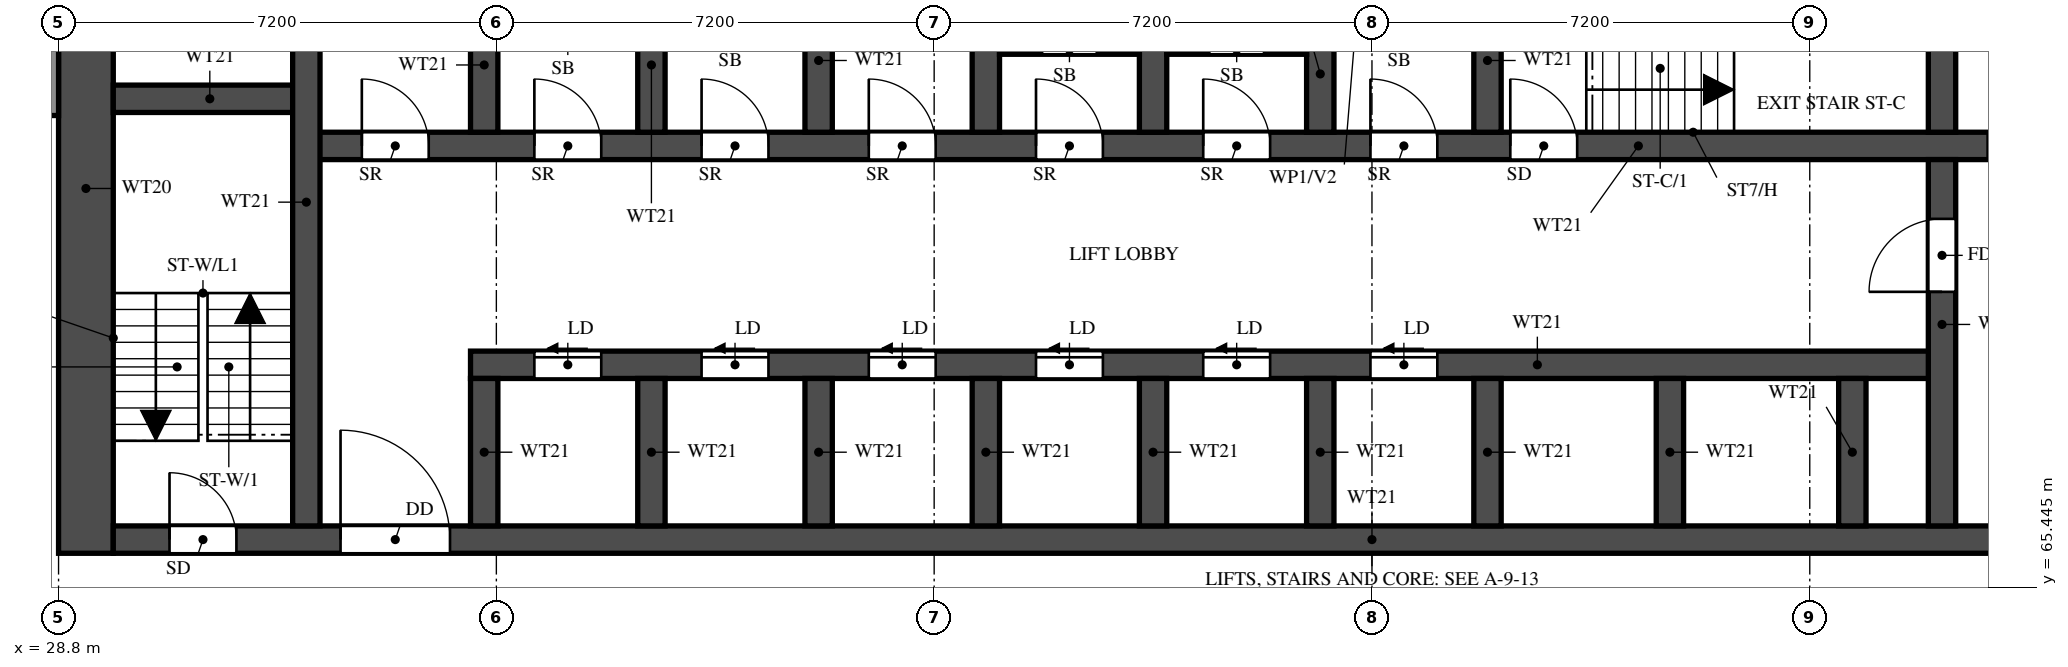
"""IFC4 building model, lengths in metres.
Left out: names, types, materials, properties, quantities, classifications, styles, units other than length and angle.
Written with IfcOpenShell. Run it as: python <this file> out.ifc"""

import sys

from ifc_helpers import new_model, si_unit, direction, frame, frame_2d, origin, place, context, subcontext, project, spatial, rectangle, extrude, element, fill, save


model = new_model("IFC4")
c1 = context("Model", 3, precision=1e-05, world=origin(), true_north=direction((0.0, 1.0)))
c2 = subcontext(c1, "Body", "Model", "MODEL_VIEW")
j1 = project(units=[si_unit("LENGTHUNIT", "METRE"), si_unit("PLANEANGLEUNIT", "RADIAN")], contexts=[c1])
p1 = place(None, origin())
s1 = spatial("IfcSite", under=j1, at=p1, CompositionType="ELEMENT")
p2 = place(p1, origin())
s2 = spatial("IfcBuilding", under=s1, at=p2, CompositionType="ELEMENT")
p3 = place(p2, frame((0.0, 0.0, 86.5)))
s3 = spatial("IfcBuildingStorey", under=s2, at=p3, CompositionType="ELEMENT", Elevation=86.5)
p4 = place(p3, frame((29.25, 66.0, 0.0), z_axis=(0.0, 0.0, 1.0), x_axis=(0.0, 1.0, 0.0)))
e1 = element("IfcWall", 1, at=p4, inside=s3, PredefinedType="SHEAR", context=c2, shape_type="SweptSolid", body=[
    extrude(rectangle(XDim=12.0, YDim=0.9, at=frame_2d((6.0, 0.0))), origin(), (0.0, 0.0, 1.0), 3.18),
])
p5 = place(p3, frame((29.7, 66.225, 0.0), z_axis=(0.0, 0.0, 1.0), x_axis=(1.0, 0.0, 0.0)))
e2 = element("IfcWall", 2, at=p5, inside=s3, PredefinedType="SHEAR", context=c2, shape_type="SweptSolid", body=[
    extrude(rectangle(XDim=41.4, YDim=0.45, at=frame_2d((20.7, 0.0))), origin(), (0.0, 0.0, 1.0), 3.18),
])
p6 = place(p5, frame((0.925, 0.0, 0.0)))
e3 = element("IfcOpeningElement", 3, at=p6, cuts=e2, PredefinedType="OPENING", context=c2, shape_type="SweptSolid", body=[
    extrude(rectangle(XDim=1.1, YDim=2.1, at=frame_2d((0.55, 1.05))), frame((0.0, 0.235, 0.0), z_axis=(0.0, -1.0, 0.0), x_axis=(1.0, 0.0, 0.0)), (0.0, 0.0, 1.0), 0.47),
])
p7 = place(p5, frame((3.738, 0.0, 0.0)))
e4 = element("IfcOpeningElement", 4, at=p7, cuts=e2, PredefinedType="OPENING", context=c2, shape_type="SweptSolid", body=[
    extrude(rectangle(XDim=1.8, YDim=2.1, at=frame_2d((0.9, 1.05))), frame((0.0, 0.235, 0.0), z_axis=(0.0, -1.0, 0.0), x_axis=(1.0, 0.0, 0.0)), (0.0, 0.0, 1.0), 0.47),
])
p8 = place(p3, frame((35.575, 69.1, 0.0), z_axis=(0.0, 0.0, 1.0), x_axis=(1.0, 0.0, 0.0)))
e5 = element("IfcWall", 5, at=p8, inside=s3, PredefinedType="SHEAR", context=c2, shape_type="SweptSolid", body=[
    extrude(rectangle(XDim=24.2, YDim=0.45, at=frame_2d((12.1, 0.0))), origin(), (0.0, 0.0, 1.0), 3.18),
])
p9 = place(p8, frame((1.05, 0.0, 0.0)))
e6 = element("IfcOpeningElement", 6, at=p9, cuts=e5, PredefinedType="OPENING", context=c2, shape_type="SweptSolid", body=[
    extrude(rectangle(XDim=1.1, YDim=2.1, at=frame_2d((0.55, 1.05))), frame((0.0, 0.235, 0.0), z_axis=(0.0, -1.0, 0.0), x_axis=(1.0, 0.0, 0.0)), (0.0, 0.0, 1.0), 0.47),
])
p10 = place(p8, frame((3.8, 0.0, 0.0)))
e7 = element("IfcOpeningElement", 7, at=p10, cuts=e5, PredefinedType="OPENING", context=c2, shape_type="SweptSolid", body=[
    extrude(rectangle(XDim=1.1, YDim=2.1, at=frame_2d((0.55, 1.05))), frame((0.0, 0.235, 0.0), z_axis=(0.0, -1.0, 0.0), x_axis=(1.0, 0.0, 0.0)), (0.0, 0.0, 1.0), 0.47),
])
p11 = place(p8, frame((6.55, 0.0, 0.0)))
e8 = element("IfcOpeningElement", 8, at=p11, cuts=e5, PredefinedType="OPENING", context=c2, shape_type="SweptSolid", body=[
    extrude(rectangle(XDim=1.1, YDim=2.1, at=frame_2d((0.55, 1.05))), frame((0.0, 0.235, 0.0), z_axis=(0.0, -1.0, 0.0), x_axis=(1.0, 0.0, 0.0)), (0.0, 0.0, 1.0), 0.47),
])
p12 = place(p8, frame((9.3, 0.0, 0.0)))
e9 = element("IfcOpeningElement", 9, at=p12, cuts=e5, PredefinedType="OPENING", context=c2, shape_type="SweptSolid", body=[
    extrude(rectangle(XDim=1.1, YDim=2.1, at=frame_2d((0.55, 1.05))), frame((0.0, 0.235, 0.0), z_axis=(0.0, -1.0, 0.0), x_axis=(1.0, 0.0, 0.0)), (0.0, 0.0, 1.0), 0.47),
])
p13 = place(p8, frame((12.05, 0.0, 0.0)))
e10 = element("IfcOpeningElement", 10, at=p13, cuts=e5, PredefinedType="OPENING", context=c2, shape_type="SweptSolid", body=[
    extrude(rectangle(XDim=1.1, YDim=2.1, at=frame_2d((0.55, 1.05))), frame((0.0, 0.235, 0.0), z_axis=(0.0, -1.0, 0.0), x_axis=(1.0, 0.0, 0.0)), (0.0, 0.0, 1.0), 0.47),
])
p14 = place(p8, frame((14.8, 0.0, 0.0)))
e11 = element("IfcOpeningElement", 11, at=p14, cuts=e5, PredefinedType="OPENING", context=c2, shape_type="SweptSolid", body=[
    extrude(rectangle(XDim=1.1, YDim=2.1, at=frame_2d((0.55, 1.05))), frame((0.0, 0.235, 0.0), z_axis=(0.0, -1.0, 0.0), x_axis=(1.0, 0.0, 0.0)), (0.0, 0.0, 1.0), 0.47),
])
p15 = place(p3, frame((32.875, 72.7, 0.0), z_axis=(0.0, 0.0, 1.0), x_axis=(1.0, 0.0, 0.0)))
e12 = element("IfcWall", 12, at=p15, inside=s3, PredefinedType="SHEAR", context=c2, shape_type="SweptSolid", body=[
    extrude(rectangle(XDim=35.05, YDim=0.45, at=frame_2d((17.525, 0.0))), origin(), (0.0, 0.0, 1.0), 3.18),
])
p16 = place(p15, frame((19.8, 0.0, 0.0)))
e13 = element("IfcOpeningElement", 13, at=p16, cuts=e12, PredefinedType="OPENING", context=c2, shape_type="SweptSolid", body=[
    extrude(rectangle(XDim=1.1, YDim=2.1, at=frame_2d((0.55, 1.05))), frame((0.0, 0.235, 0.0), z_axis=(0.0, -1.0, 0.0), x_axis=(1.0, 0.0, 0.0)), (0.0, 0.0, 1.0), 0.47),
])
p17 = place(p15, frame((27.65, 0.0, 0.0)))
e14 = element("IfcOpeningElement", 14, at=p17, cuts=e12, PredefinedType="OPENING", context=c2, shape_type="SweptSolid", body=[
    extrude(rectangle(XDim=1.1, YDim=2.1, at=frame_2d((0.55, 1.05))), frame((0.0, 0.235, 0.0), z_axis=(0.0, -1.0, 0.0), x_axis=(1.0, 0.0, 0.0)), (0.0, 0.0, 1.0), 0.47),
])
p18 = place(p15, frame((30.25, 0.0, 0.0)))
e15 = element("IfcOpeningElement", 15, at=p18, cuts=e12, PredefinedType="OPENING", context=c2, shape_type="SweptSolid", body=[
    extrude(rectangle(XDim=1.1, YDim=2.1, at=frame_2d((0.55, 1.05))), frame((0.0, 0.235, 0.0), z_axis=(0.0, -1.0, 0.0), x_axis=(1.0, 0.0, 0.0)), (0.0, 0.0, 1.0), 0.47),
])
p19 = place(p15, frame((3.75, 0.0, 0.0)))
e16 = element("IfcOpeningElement", 16, at=p19, cuts=e12, PredefinedType="OPENING", context=c2, shape_type="SweptSolid", body=[
    extrude(rectangle(XDim=1.1, YDim=2.1, at=frame_2d((0.55, 1.05))), frame((0.0, 0.235, 0.0), z_axis=(0.0, -1.0, 0.0), x_axis=(1.0, 0.0, 0.0)), (0.0, 0.0, 1.0), 0.47),
])
p20 = place(p15, frame((6.5, 0.0, 0.0)))
e17 = element("IfcOpeningElement", 17, at=p20, cuts=e12, PredefinedType="OPENING", context=c2, shape_type="SweptSolid", body=[
    extrude(rectangle(XDim=1.1, YDim=2.1, at=frame_2d((0.55, 1.05))), frame((0.0, 0.235, 0.0), z_axis=(0.0, -1.0, 0.0), x_axis=(1.0, 0.0, 0.0)), (0.0, 0.0, 1.0), 0.47),
])
p21 = place(p15, frame((9.25, 0.0, 0.0)))
e18 = element("IfcOpeningElement", 18, at=p21, cuts=e12, PredefinedType="OPENING", context=c2, shape_type="SweptSolid", body=[
    extrude(rectangle(XDim=1.1, YDim=2.1, at=frame_2d((0.55, 1.05))), frame((0.0, 0.235, 0.0), z_axis=(0.0, -1.0, 0.0), x_axis=(1.0, 0.0, 0.0)), (0.0, 0.0, 1.0), 0.47),
])
p22 = place(p15, frame((12.0, 0.0, 0.0)))
e19 = element("IfcOpeningElement", 19, at=p22, cuts=e12, PredefinedType="OPENING", context=c2, shape_type="SweptSolid", body=[
    extrude(rectangle(XDim=1.1, YDim=2.1, at=frame_2d((0.55, 1.05))), frame((0.0, 0.235, 0.0), z_axis=(0.0, -1.0, 0.0), x_axis=(1.0, 0.0, 0.0)), (0.0, 0.0, 1.0), 0.47),
])
p23 = place(p15, frame((14.75, 0.0, 0.0)))
e20 = element("IfcOpeningElement", 20, at=p23, cuts=e12, PredefinedType="OPENING", context=c2, shape_type="SweptSolid", body=[
    extrude(rectangle(XDim=1.1, YDim=2.1, at=frame_2d((0.55, 1.05))), frame((0.0, 0.235, 0.0), z_axis=(0.0, -1.0, 0.0), x_axis=(1.0, 0.0, 0.0)), (0.0, 0.0, 1.0), 0.47),
])
p24 = place(p15, frame((17.5, 0.0, 0.0)))
e21 = element("IfcOpeningElement", 21, at=p24, cuts=e12, PredefinedType="OPENING", context=c2, shape_type="SweptSolid", body=[
    extrude(rectangle(XDim=1.1, YDim=2.1, at=frame_2d((0.55, 1.05))), frame((0.0, 0.235, 0.0), z_axis=(0.0, -1.0, 0.0), x_axis=(1.0, 0.0, 0.0)), (0.0, 0.0, 1.0), 0.47),
])
p25 = place(p15, frame((0.913, 0.0, 0.0)))
e22 = element("IfcOpeningElement", 22, at=p25, cuts=e12, PredefinedType="OPENING", context=c2, shape_type="SweptSolid", body=[
    extrude(rectangle(XDim=1.1, YDim=2.1, at=frame_2d((0.55, 1.05))), frame((0.0, 0.235, 0.0), z_axis=(0.0, -1.0, 0.0), x_axis=(1.0, 0.0, 0.0)), (0.0, 0.0, 1.0), 0.47),
])
p26 = place(p3, frame((29.7, 73.475, 0.0), z_axis=(0.0, 0.0, 1.0), x_axis=(1.0, 0.0, 0.0)))
e23 = element("IfcWall", 23, at=p26, inside=s3, PredefinedType="SHEAR", context=c2, shape_type="SweptSolid", body=[
    extrude(rectangle(XDim=3.175, YDim=0.45, at=frame_2d((1.587, 0.0))), origin(), (0.0, 0.0, 1.0), 3.18),
])
p27 = place(p3, frame((32.875, 66.45, 0.0), z_axis=(0.0, 0.0, 1.0), x_axis=(0.0, 1.0, 0.0)))
e24 = element("IfcWall", 24, at=p27, inside=s3, PredefinedType="SHEAR", context=c2, shape_type="SweptSolid", body=[
    extrude(rectangle(XDim=10.65, YDim=0.45, at=frame_2d((5.325, 0.0))), origin(), (0.0, 0.0, 1.0), 3.18),
])
p28 = place(p3, frame((59.775, 66.45, 0.0), z_axis=(0.0, 0.0, 1.0), x_axis=(0.0, 1.0, 0.0)))
e25 = element("IfcWall", 25, at=p28, inside=s3, PredefinedType="SHEAR", context=c2, shape_type="SweptSolid", body=[
    extrude(rectangle(XDim=6.025, YDim=0.45, at=frame_2d((3.013, 0.0))), origin(), (0.0, 0.0, 1.0), 3.18),
])
p29 = place(p28, frame((3.85, 0.0, 0.0)))
e26 = element("IfcOpeningElement", 26, at=p29, cuts=e25, PredefinedType="OPENING", context=c2, shape_type="SweptSolid", body=[
    extrude(rectangle(XDim=1.2, YDim=2.1, at=frame_2d((0.6, 1.05))), frame((0.0, 0.235, 0.0), z_axis=(0.0, -1.0, 0.0), x_axis=(1.0, 0.0, 0.0)), (0.0, 0.0, 1.0), 0.47),
])
p30 = place(p3, frame((59.775, 72.925, 0.0), z_axis=(0.0, 0.0, 1.0), x_axis=(0.0, 1.0, 0.0)))
e27 = element("IfcWall", 27, at=p30, inside=s3, PredefinedType="SHEAR", context=c2, shape_type="SweptSolid", body=[
    extrude(rectangle(XDim=2.95, YDim=0.45, at=frame_2d((1.475, 0.0))), origin(), (0.0, 0.0, 1.0), 3.18),
])
for number, where, z_axis, x_axis in (
    (28, (35.8, 66.45, 0.0), (0.0, 0.0, 1.0), (0.0, 1.0, 0.0)),
    (29, (38.55, 66.45, 0.0), (0.0, 0.0, 1.0), (0.0, 1.0, 0.0)),
    (30, (41.3, 66.45, 0.0), (0.0, 0.0, 1.0), (0.0, 1.0, 0.0)),
    (31, (44.05, 66.45, 0.0), (0.0, 0.0, 1.0), (0.0, 1.0, 0.0)),
    (32, (46.8, 66.45, 0.0), (0.0, 0.0, 1.0), (0.0, 1.0, 0.0)),
    (33, (49.55, 66.45, 0.0), (0.0, 0.0, 1.0), (0.0, 1.0, 0.0)),
    (34, (52.3, 66.45, 0.0), (0.0, 0.0, 1.0), (0.0, 1.0, 0.0)),
    (35, (55.3, 66.45, 0.0), (0.0, 0.0, 1.0), (0.0, 1.0, 0.0)),
    (36, (58.3, 66.45, 0.0), (0.0, 0.0, 1.0), (0.0, 1.0, 0.0)),
):
    element("IfcWall", number, at=place(p3, frame(where, z_axis=z_axis, x_axis=x_axis)), inside=s3, PredefinedType="SHEAR", context=c2, shape_type="SweptSolid", body=[
        extrude(rectangle(XDim=2.425, YDim=0.45, at=frame_2d((1.212, 0.0))), origin(), (0.0, 0.0, 1.0), 3.18),
    ])
for number, where, z_axis, x_axis in (
    (37, (35.8, 72.925, 0.0), (0.0, 0.0, 1.0), (0.0, 1.0, 0.0)),
    (38, (38.55, 72.925, 0.0), (0.0, 0.0, 1.0), (0.0, 1.0, 0.0)),
    (39, (41.3, 72.925, 0.0), (0.0, 0.0, 1.0), (0.0, 1.0, 0.0)),
    (40, (44.05, 72.925, 0.0), (0.0, 0.0, 1.0), (0.0, 1.0, 0.0)),
    (41, (46.8, 72.925, 0.0), (0.0, 0.0, 1.0), (0.0, 1.0, 0.0)),
    (42, (49.55, 72.925, 0.0), (0.0, 0.0, 1.0), (0.0, 1.0, 0.0)),
    (43, (52.3, 72.925, 0.0), (0.0, 0.0, 1.0), (0.0, 1.0, 0.0)),
):
    element("IfcWall", number, at=place(p3, frame(where, z_axis=z_axis, x_axis=x_axis)), inside=s3, PredefinedType="SHEAR", context=c2, shape_type="SweptSolid", body=[
        extrude(rectangle(XDim=2.95, YDim=0.45, at=frame_2d((1.475, 0.0))), origin(), (0.0, 0.0, 1.0), 3.18),
    ])
p31 = place(p3, frame((44.275, 74.282, 0.0), z_axis=(0.0, 0.0, 1.0), x_axis=(1.0, 0.0, 0.0)))
e44 = element("IfcWall", 44, at=p31, inside=s3, PredefinedType="PARTITIONING", context=c2, shape_type="SweptSolid", body=[
    extrude(rectangle(XDim=2.3, YDim=0.15, at=frame_2d((1.15, 0.0))), origin(), (0.0, 0.0, 1.0), 3.18),
])
p32 = place(p31, frame((0.7, 0.0, 0.0)))
e45 = element("IfcOpeningElement", 45, at=p32, cuts=e44, PredefinedType="OPENING", context=c2, shape_type="SweptSolid", body=[
    extrude(rectangle(XDim=0.9, YDim=2.1, at=frame_2d((0.45, 1.05))), frame((0.0, 0.085, 0.0), z_axis=(0.0, -1.0, 0.0), x_axis=(1.0, 0.0, 0.0)), (0.0, 0.0, 1.0), 0.17),
])
p33 = place(p3, frame((47.025, 74.282, 0.0), z_axis=(0.0, 0.0, 1.0), x_axis=(1.0, 0.0, 0.0)))
e46 = element("IfcWall", 46, at=p33, inside=s3, PredefinedType="PARTITIONING", context=c2, shape_type="SweptSolid", body=[
    extrude(rectangle(XDim=2.3, YDim=0.15, at=frame_2d((1.15, 0.0))), origin(), (0.0, 0.0, 1.0), 3.18),
])
p34 = place(p33, frame((0.7, 0.0, 0.0)))
e47 = element("IfcOpeningElement", 47, at=p34, cuts=e46, PredefinedType="OPENING", context=c2, shape_type="SweptSolid", body=[
    extrude(rectangle(XDim=0.9, YDim=2.1, at=frame_2d((0.45, 1.05))), frame((0.0, 0.085, 0.0), z_axis=(0.0, -1.0, 0.0), x_axis=(1.0, 0.0, 0.0)), (0.0, 0.0, 1.0), 0.17),
])
p35 = place(p3, frame((28.7, 73.2, 0.0), z_axis=(0.0, 0.0, 1.0), x_axis=(0.0, 1.0, 0.0)))
e48 = element("IfcWall", 48, at=p35, inside=s3, PredefinedType="SOLIDWALL", context=c2, shape_type="SweptSolid", body=[
    extrude(rectangle(XDim=4.8, YDim=0.2, at=frame_2d((2.4, 0.0))), origin(), (0.0, 0.0, 1.0), 3.18),
])
p36 = place(p6, origin())
e49 = element("IfcDoor", 49, at=p36, inside=s3, OperationType="SINGLE_SWING_LEFT", PredefinedType="DOOR", context=c2, shape_type="SweptSolid", body=[
    extrude(rectangle(XDim=1.1, YDim=2.1, at=frame_2d((0.55, 1.05))), frame((0.0, 0.025, 0.0), z_axis=(0.0, -1.0, 0.0), x_axis=(1.0, 0.0, 0.0)), (0.0, 0.0, 1.0), 0.05),
])
fill(e3, e49)
p37 = place(p16, origin())
e50 = element("IfcDoor", 50, at=p37, inside=s3, OperationType="SINGLE_SWING_LEFT", PredefinedType="DOOR", context=c2, shape_type="SweptSolid", body=[
    extrude(rectangle(XDim=1.1, YDim=2.1, at=frame_2d((0.55, 1.05))), frame((0.0, 0.025, 0.0), z_axis=(0.0, -1.0, 0.0), x_axis=(1.0, 0.0, 0.0)), (0.0, 0.0, 1.0), 0.05),
])
fill(e13, e50)
p38 = place(p7, origin())
e51 = element("IfcDoor", 51, at=p38, inside=s3, OperationType="DOUBLE_DOOR_SINGLE_SWING", PredefinedType="DOOR", context=c2, shape_type="SweptSolid", body=[
    extrude(rectangle(XDim=1.8, YDim=2.1, at=frame_2d((0.9, 1.05))), frame((0.0, 0.025, 0.0), z_axis=(0.0, -1.0, 0.0), x_axis=(1.0, 0.0, 0.0)), (0.0, 0.0, 1.0), 0.05),
])
fill(e4, e51)
p39 = place(p29, origin())
e52 = element("IfcDoor", 52, at=p39, inside=s3, OperationType="SINGLE_SWING_RIGHT", PredefinedType="DOOR", context=c2, shape_type="SweptSolid", body=[
    extrude(rectangle(XDim=1.2, YDim=2.1, at=frame_2d((0.6, 1.05))), frame((0.0, 0.025, 0.0), z_axis=(0.0, -1.0, 0.0), x_axis=(1.0, 0.0, 0.0)), (0.0, 0.0, 1.0), 0.05),
])
fill(e26, e52)
p40 = place(p17, origin())
e53 = element("IfcDoor", 53, at=p40, inside=s3, OperationType="SLIDING_TO_LEFT", PredefinedType="DOOR", context=c2, shape_type="SweptSolid", body=[
    extrude(rectangle(XDim=1.1, YDim=2.1, at=frame_2d((0.55, 1.05))), frame((0.0, 0.025, 0.0), z_axis=(0.0, -1.0, 0.0), x_axis=(1.0, 0.0, 0.0)), (0.0, 0.0, 1.0), 0.05),
])
fill(e14, e53)
p41 = place(p9, origin())
e54 = element("IfcDoor", 54, at=p41, inside=s3, OperationType="SLIDING_TO_LEFT", PredefinedType="DOOR", context=c2, shape_type="SweptSolid", body=[
    extrude(rectangle(XDim=1.1, YDim=2.1, at=frame_2d((0.55, 1.05))), frame((0.0, 0.025, 0.0), z_axis=(0.0, -1.0, 0.0), x_axis=(1.0, 0.0, 0.0)), (0.0, 0.0, 1.0), 0.05),
])
fill(e6, e54)
p42 = place(p10, origin())
e55 = element("IfcDoor", 55, at=p42, inside=s3, OperationType="SLIDING_TO_LEFT", PredefinedType="DOOR", context=c2, shape_type="SweptSolid", body=[
    extrude(rectangle(XDim=1.1, YDim=2.1, at=frame_2d((0.55, 1.05))), frame((0.0, 0.025, 0.0), z_axis=(0.0, -1.0, 0.0), x_axis=(1.0, 0.0, 0.0)), (0.0, 0.0, 1.0), 0.05),
])
fill(e7, e55)
p43 = place(p11, origin())
e56 = element("IfcDoor", 56, at=p43, inside=s3, OperationType="SLIDING_TO_LEFT", PredefinedType="DOOR", context=c2, shape_type="SweptSolid", body=[
    extrude(rectangle(XDim=1.1, YDim=2.1, at=frame_2d((0.55, 1.05))), frame((0.0, 0.025, 0.0), z_axis=(0.0, -1.0, 0.0), x_axis=(1.0, 0.0, 0.0)), (0.0, 0.0, 1.0), 0.05),
])
fill(e8, e56)
p44 = place(p12, origin())
e57 = element("IfcDoor", 57, at=p44, inside=s3, OperationType="SLIDING_TO_LEFT", PredefinedType="DOOR", context=c2, shape_type="SweptSolid", body=[
    extrude(rectangle(XDim=1.1, YDim=2.1, at=frame_2d((0.55, 1.05))), frame((0.0, 0.025, 0.0), z_axis=(0.0, -1.0, 0.0), x_axis=(1.0, 0.0, 0.0)), (0.0, 0.0, 1.0), 0.05),
])
fill(e9, e57)
p45 = place(p13, origin())
e58 = element("IfcDoor", 58, at=p45, inside=s3, OperationType="SLIDING_TO_LEFT", PredefinedType="DOOR", context=c2, shape_type="SweptSolid", body=[
    extrude(rectangle(XDim=1.1, YDim=2.1, at=frame_2d((0.55, 1.05))), frame((0.0, 0.025, 0.0), z_axis=(0.0, -1.0, 0.0), x_axis=(1.0, 0.0, 0.0)), (0.0, 0.0, 1.0), 0.05),
])
fill(e10, e58)
p46 = place(p14, origin())
e59 = element("IfcDoor", 59, at=p46, inside=s3, OperationType="SLIDING_TO_LEFT", PredefinedType="DOOR", context=c2, shape_type="SweptSolid", body=[
    extrude(rectangle(XDim=1.1, YDim=2.1, at=frame_2d((0.55, 1.05))), frame((0.0, 0.025, 0.0), z_axis=(0.0, -1.0, 0.0), x_axis=(1.0, 0.0, 0.0)), (0.0, 0.0, 1.0), 0.05),
])
fill(e11, e59)
p47 = place(p19, origin())
e60 = element("IfcDoor", 60, at=p47, inside=s3, OperationType="SINGLE_SWING_LEFT", PredefinedType="DOOR", context=c2, shape_type="SweptSolid", body=[
    extrude(rectangle(XDim=1.1, YDim=2.1, at=frame_2d((0.55, 1.05))), frame((0.0, 0.025, 0.0), z_axis=(0.0, -1.0, 0.0), x_axis=(1.0, 0.0, 0.0)), (0.0, 0.0, 1.0), 0.05),
])
fill(e16, e60)
p48 = place(p20, origin())
e61 = element("IfcDoor", 61, at=p48, inside=s3, OperationType="SINGLE_SWING_LEFT", PredefinedType="DOOR", context=c2, shape_type="SweptSolid", body=[
    extrude(rectangle(XDim=1.1, YDim=2.1, at=frame_2d((0.55, 1.05))), frame((0.0, 0.025, 0.0), z_axis=(0.0, -1.0, 0.0), x_axis=(1.0, 0.0, 0.0)), (0.0, 0.0, 1.0), 0.05),
])
fill(e17, e61)
p49 = place(p21, origin())
e62 = element("IfcDoor", 62, at=p49, inside=s3, OperationType="SINGLE_SWING_LEFT", PredefinedType="DOOR", context=c2, shape_type="SweptSolid", body=[
    extrude(rectangle(XDim=1.1, YDim=2.1, at=frame_2d((0.55, 1.05))), frame((0.0, 0.025, 0.0), z_axis=(0.0, -1.0, 0.0), x_axis=(1.0, 0.0, 0.0)), (0.0, 0.0, 1.0), 0.05),
])
fill(e18, e62)
p50 = place(p22, origin())
e63 = element("IfcDoor", 63, at=p50, inside=s3, OperationType="SINGLE_SWING_LEFT", PredefinedType="DOOR", context=c2, shape_type="SweptSolid", body=[
    extrude(rectangle(XDim=1.1, YDim=2.1, at=frame_2d((0.55, 1.05))), frame((0.0, 0.025, 0.0), z_axis=(0.0, -1.0, 0.0), x_axis=(1.0, 0.0, 0.0)), (0.0, 0.0, 1.0), 0.05),
])
fill(e19, e63)
p51 = place(p23, origin())
e64 = element("IfcDoor", 64, at=p51, inside=s3, OperationType="SINGLE_SWING_LEFT", PredefinedType="DOOR", context=c2, shape_type="SweptSolid", body=[
    extrude(rectangle(XDim=1.1, YDim=2.1, at=frame_2d((0.55, 1.05))), frame((0.0, 0.025, 0.0), z_axis=(0.0, -1.0, 0.0), x_axis=(1.0, 0.0, 0.0)), (0.0, 0.0, 1.0), 0.05),
])
fill(e20, e64)
p52 = place(p24, origin())
e65 = element("IfcDoor", 65, at=p52, inside=s3, OperationType="SINGLE_SWING_LEFT", PredefinedType="DOOR", context=c2, shape_type="SweptSolid", body=[
    extrude(rectangle(XDim=1.1, YDim=2.1, at=frame_2d((0.55, 1.05))), frame((0.0, 0.025, 0.0), z_axis=(0.0, -1.0, 0.0), x_axis=(1.0, 0.0, 0.0)), (0.0, 0.0, 1.0), 0.05),
])
fill(e21, e65)
p53 = place(p25, origin())
e66 = element("IfcDoor", 66, at=p53, inside=s3, OperationType="SINGLE_SWING_LEFT", PredefinedType="DOOR", context=c2, shape_type="SweptSolid", body=[
    extrude(rectangle(XDim=1.1, YDim=2.1, at=frame_2d((0.55, 1.05))), frame((0.0, 0.025, 0.0), z_axis=(0.0, -1.0, 0.0), x_axis=(1.0, 0.0, 0.0)), (0.0, 0.0, 1.0), 0.05),
])
fill(e22, e66)
save(model, sys.argv[1])
